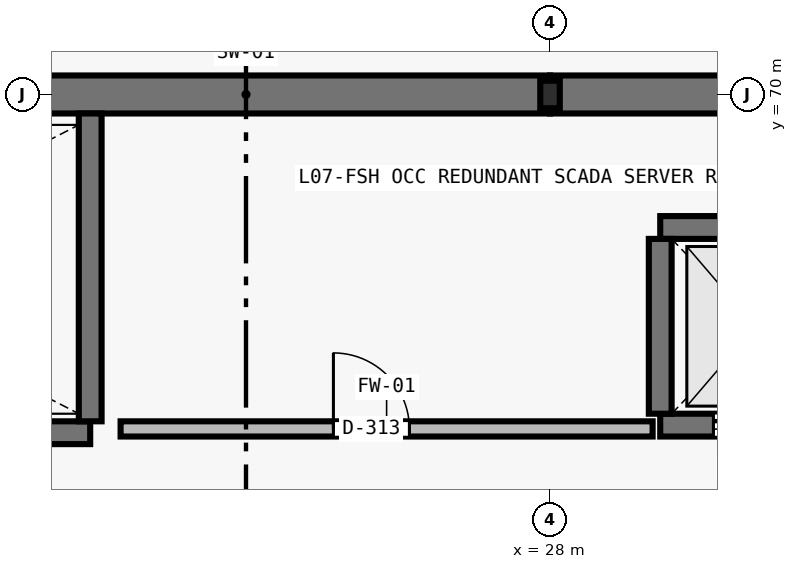
"""IFC4 building model, lengths in metres.
Left out: names, types, materials, properties, quantities, classifications, styles, units other than length and angle.
Written with IfcOpenShell. Run it as: python <this file> out.ifc"""

import sys

from ifc_helpers import new_model, si_unit, direction, frame, frame_2d, origin, origin_2d, place, context, subcontext, project, spatial, rectangle, i_section, extrude, element, fill, save


model = new_model("IFC4")
c1 = context("Model", 3, precision=1e-05, world=origin(), true_north=direction((0.0, 1.0)))
c2 = subcontext(c1, "Body", "Model", "MODEL_VIEW")
j1 = project(units=[si_unit("LENGTHUNIT", "METRE"), si_unit("PLANEANGLEUNIT", "RADIAN")], contexts=[c1])
p1 = place(None, origin())
s1 = spatial("IfcSite", under=j1, at=p1, CompositionType="ELEMENT")
p2 = place(p1, origin())
s2 = spatial("IfcBuilding", under=s1, at=p2, CompositionType="ELEMENT")
p3 = place(p2, frame((0.0, 0.0, 32.2)))
s3 = spatial("IfcBuildingStorey", under=s2, at=p3, CompositionType="ELEMENT", Elevation=32.2)
p4 = place(p3, frame((28.0, 70.0, 0.0), z_axis=(0.0, 0.0, 1.0), x_axis=(1.0, 0.0, 0.0)))
e1 = element("IfcColumn", 1, at=p4, inside=s3, PredefinedType="COLUMN", context=c2, shape_type="SweptSolid", body=[
    extrude(i_section(OverallWidth=0.257, OverallDepth=0.363, WebThickness=0.013, FlangeThickness=0.022, at=origin_2d()), origin(), (0.0, 0.0, 1.0), 3.96),
])
p5 = place(p3, frame((20.0, 70.0, 0.0), z_axis=(0.0, 0.0, 1.0), x_axis=(1.0, 0.0, 0.0)))
e2 = element("IfcWall", 2, at=p5, inside=s3, PredefinedType="SHEAR", context=c2, shape_type="SweptSolid", body=[
    extrude(rectangle(XDim=8.0, YDim=0.5, at=frame_2d((4.0, 0.0))), origin(), (0.0, 0.0, 1.0), 3.96),
])
p6 = place(p3, frame((28.0, 70.0, 0.0), z_axis=(0.0, 0.0, 1.0), x_axis=(1.0, 0.0, 0.0)))
e3 = element("IfcWall", 3, at=p6, inside=s3, PredefinedType="SHEAR", context=c2, shape_type="SweptSolid", body=[
    extrude(rectangle(XDim=7.872, YDim=0.5, at=frame_2d((3.936, 0.0))), origin(), (0.0, 0.0, 1.0), 3.96),
])
p7 = place(p3, frame((12.2, 65.55, 0.0), z_axis=(0.0, 0.0, 1.0), x_axis=(1.0, 0.0, 0.0)))
e4 = element("IfcWall", 4, at=p7, inside=s3, PredefinedType="SHEAR", context=c2, shape_type="SweptSolid", body=[
    extrude(rectangle(XDim=9.75, YDim=0.3, at=frame_2d((4.875, 0.0))), origin(), (0.0, 0.0, 1.0), 3.96),
])
p8 = place(p7, frame((0.55, 0.0, 0.0)))
e5 = element("IfcOpeningElement", 5, at=p8, cuts=e4, PredefinedType="OPENING", context=c2, shape_type="SweptSolid", body=[
    extrude(rectangle(XDim=1.2, YDim=2.2, at=frame_2d((0.6, 1.1))), frame((0.0, 0.16, 0.0), z_axis=(0.0, -1.0, 0.0), x_axis=(1.0, 0.0, 0.0)), (0.0, 0.0, 1.0), 0.32),
])
p9 = place(p3, frame((21.95, 65.7, 0.0), z_axis=(0.0, 0.0, 1.0), x_axis=(0.0, 1.0, 0.0)))
e6 = element("IfcWall", 6, at=p9, inside=s3, PredefinedType="SHEAR", context=c2, shape_type="SweptSolid", body=[
    extrude(rectangle(XDim=4.05, YDim=0.3, at=frame_2d((2.025, 0.0))), origin(), (0.0, 0.0, 1.0), 3.96),
])
p10 = place(p3, frame((29.45, 65.65, 0.0), z_axis=(0.0, 0.0, 1.0), x_axis=(1.0, 0.0, 0.0)))
e7 = element("IfcWall", 7, at=p10, inside=s3, PredefinedType="SHEAR", context=c2, shape_type="SweptSolid", body=[
    extrude(rectangle(XDim=4.9, YDim=0.3, at=frame_2d((2.45, 0.0))), origin(), (0.0, 0.0, 1.0), 3.96),
])
p11 = place(p10, frame((0.7, 0.0, 0.0)))
e8 = element("IfcOpeningElement", 8, at=p11, cuts=e7, PredefinedType="OPENING", context=c2, shape_type="SweptSolid", body=[
    extrude(rectangle(XDim=1.08, YDim=2.2, at=frame_2d((0.54, 1.1))), frame((0.0, 0.16, 0.0), z_axis=(0.0, -1.0, 0.0), x_axis=(1.0, 0.0, 0.0)), (0.0, 0.0, 1.0), 0.32),
])
p12 = place(p10, frame((3.1, 0.0, 0.0)))
e9 = element("IfcOpeningElement", 9, at=p12, cuts=e7, PredefinedType="OPENING", context=c2, shape_type="SweptSolid", body=[
    extrude(rectangle(XDim=1.08, YDim=2.2, at=frame_2d((0.54, 1.1))), frame((0.0, 0.16, 0.0), z_axis=(0.0, -1.0, 0.0), x_axis=(1.0, 0.0, 0.0)), (0.0, 0.0, 1.0), 0.32),
])
p13 = place(p3, frame((29.45, 68.25, 0.0), z_axis=(0.0, 0.0, 1.0), x_axis=(1.0, 0.0, 0.0)))
e10 = element("IfcWall", 10, at=p13, inside=s3, PredefinedType="SHEAR", context=c2, shape_type="SweptSolid", body=[
    extrude(rectangle(XDim=4.9, YDim=0.3, at=frame_2d((2.45, 0.0))), origin(), (0.0, 0.0, 1.0), 3.96),
])
p14 = place(p3, frame((29.45, 65.8, 0.0), z_axis=(0.0, 0.0, 1.0), x_axis=(0.0, 1.0, 0.0)))
e11 = element("IfcWall", 11, at=p14, inside=s3, PredefinedType="SHEAR", context=c2, shape_type="SweptSolid", body=[
    extrude(rectangle(XDim=2.3, YDim=0.3, at=frame_2d((1.15, 0.0))), origin(), (0.0, 0.0, 1.0), 3.96),
])
p15 = place(p3, frame((22.35, 65.6, 0.0), z_axis=(0.0, 0.0, 1.0), x_axis=(1.0, 0.0, 0.0)))
e12 = element("IfcWall", 12, at=p15, inside=s3, PredefinedType="SOLIDWALL", context=c2, shape_type="SweptSolid", body=[
    extrude(rectangle(XDim=7.0, YDim=0.2, at=frame_2d((3.5, 0.0))), origin(), (0.0, 0.0, 1.0), 3.96),
])
p16 = place(p15, frame((2.8, 0.0, 0.0)))
e13 = element("IfcOpeningElement", 13, at=p16, cuts=e12, PredefinedType="OPENING", context=c2, shape_type="SweptSolid", body=[
    extrude(rectangle(XDim=1.0, YDim=2.15, at=frame_2d((0.5, 1.075))), frame((0.0, 0.11, 0.0), z_axis=(0.0, -1.0, 0.0), x_axis=(1.0, 0.0, 0.0)), (0.0, 0.0, 1.0), 0.22),
])
p17 = place(p11, origin())
e14 = element("IfcDoor", 14, at=p17, inside=s3, OperationType="SLIDING_TO_LEFT", PredefinedType="DOOR", context=c2, shape_type="SweptSolid", body=[
    extrude(rectangle(XDim=1.08, YDim=2.2, at=frame_2d((0.54, 1.1))), frame((0.0, 0.025, 0.0), z_axis=(0.0, -1.0, 0.0), x_axis=(1.0, 0.0, 0.0)), (0.0, 0.0, 1.0), 0.05),
])
fill(e8, e14)
p18 = place(p16, origin())
e15 = element("IfcDoor", 15, at=p18, inside=s3, OperationType="SINGLE_SWING_LEFT", PredefinedType="DOOR", context=c2, shape_type="SweptSolid", body=[
    extrude(rectangle(XDim=1.0, YDim=2.15, at=frame_2d((0.5, 1.075))), frame((0.0, 0.025, 0.0), z_axis=(0.0, -1.0, 0.0), x_axis=(1.0, 0.0, 0.0)), (0.0, 0.0, 1.0), 0.05),
])
fill(e13, e15)
save(model, sys.argv[1])
